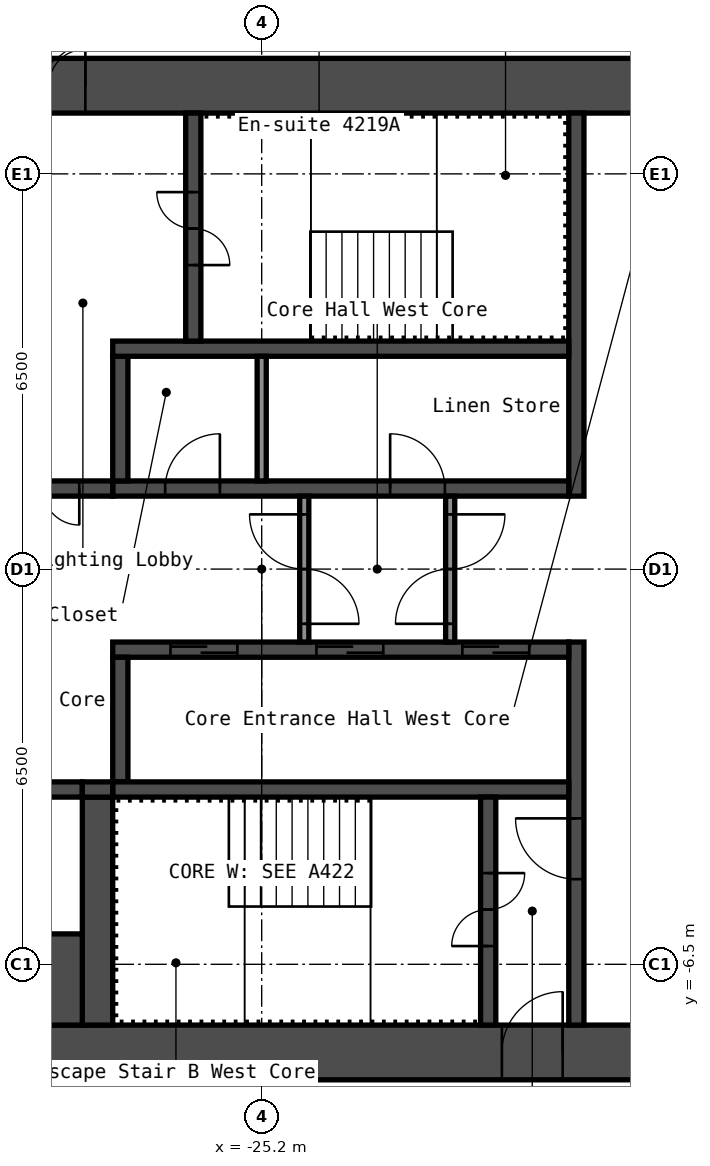
"""IFC4 building model, lengths in metres.
Left out: names, types, materials, properties, quantities, classifications, styles, units other than length and angle.
Written with IfcOpenShell. Run it as: python <this file> out.ifc"""

import sys

from ifc_helpers import new_model, si_unit, direction, frame, frame_2d, origin, place, context, subcontext, project, spatial, rectangle, extrude, element, fill, save


model = new_model("IFC4")
c1 = context("Model", 3, precision=1e-05, world=origin(), true_north=direction((0.0, 1.0)))
c2 = subcontext(c1, "Body", "Model", "MODEL_VIEW")
j1 = project(units=[si_unit("LENGTHUNIT", "METRE"), si_unit("PLANEANGLEUNIT", "RADIAN")], contexts=[c1])
p1 = place(None, origin())
s1 = spatial("IfcSite", under=j1, at=p1, CompositionType="ELEMENT")
p2 = place(p1, origin())
s2 = spatial("IfcBuilding", under=s1, at=p2, CompositionType="ELEMENT")
p3 = place(p2, frame((0.0, 0.0, 150.2)))
s3 = spatial("IfcBuildingStorey", under=s2, at=p3, CompositionType="ELEMENT", Elevation=150.2)
p4 = place(p3, frame((-32.7, 7.95, 0.0), z_axis=(0.0, 0.0, 1.0), x_axis=(1.0, 0.0, 0.0)))
e1 = element("IfcWall", 1, at=p4, inside=s3, PredefinedType="SHEAR", context=c2, shape_type="SweptSolid", body=[
    extrude(rectangle(XDim=15.0, YDim=0.9, at=frame_2d((7.5, 0.0))), origin(), (0.0, 0.0, 1.0), 2.75),
])
p5 = place(p4, frame((3.4, 0.0, 0.0)))
e2 = element("IfcOpeningElement", 2, at=p5, cuts=e1, PredefinedType="OPENING", context=c2, shape_type="SweptSolid", body=[
    extrude(rectangle(XDim=1.2, YDim=2.1, at=frame_2d((0.6, 1.05))), frame((0.0, 0.46, 0.0), z_axis=(0.0, -1.0, 0.0), x_axis=(1.0, 0.0, 0.0)), (0.0, 0.0, 1.0), 0.92),
])
p6 = place(p4, frame((0.75, 0.0, 0.0)))
e3 = element("IfcOpeningElement", 3, at=p6, cuts=e1, PredefinedType="OPENING", context=c2, shape_type="SweptSolid", body=[
    extrude(rectangle(XDim=0.9, YDim=2.1, at=frame_2d((0.45, 1.05))), frame((0.0, 0.46, 0.0), z_axis=(0.0, -1.0, 0.0), x_axis=(1.0, 0.0, 0.0)), (0.0, 0.0, 1.0), 0.92),
])
p7 = place(p3, frame((-32.7, -7.95, 0.0), z_axis=(0.0, 0.0, 1.0), x_axis=(1.0, 0.0, 0.0)))
e4 = element("IfcWall", 4, at=p7, inside=s3, PredefinedType="SHEAR", context=c2, shape_type="SweptSolid", body=[
    extrude(rectangle(XDim=15.0, YDim=0.9, at=frame_2d((7.5, 0.0))), origin(), (0.0, 0.0, 1.0), 2.75),
])
p8 = place(p7, frame((11.45, 0.0, 0.0)))
e5 = element("IfcOpeningElement", 5, at=p8, cuts=e4, PredefinedType="OPENING", context=c2, shape_type="SweptSolid", body=[
    extrude(rectangle(XDim=1.0, YDim=2.1, at=frame_2d((0.5, 1.05))), frame((0.0, 0.46, 0.0), z_axis=(0.0, -1.0, 0.0), x_axis=(1.0, 0.0, 0.0)), (0.0, 0.0, 1.0), 0.92),
])
p9 = place(p3, frame((-20.025, 1.2, 0.0), z_axis=(0.0, 0.0, 1.0), x_axis=(0.0, 1.0, 0.0)))
e6 = element("IfcWall", 6, at=p9, inside=s3, PredefinedType="SHEAR", context=c2, shape_type="SweptSolid", body=[
    extrude(rectangle(XDim=6.3, YDim=0.25, at=frame_2d((3.15, 0.0))), origin(), (0.0, 0.0, 1.0), 2.75),
])
p10 = place(p3, frame((-20.025, -7.5, 0.0), z_axis=(0.0, 0.0, 1.0), x_axis=(0.0, 1.0, 0.0)))
e7 = element("IfcWall", 7, at=p10, inside=s3, PredefinedType="SHEAR", context=c2, shape_type="SweptSolid", body=[
    extrude(rectangle(XDim=6.3, YDim=0.25, at=frame_2d((3.15, 0.0))), origin(), (0.0, 0.0, 1.0), 2.75),
])
p11 = place(p10, frame((2.4, 0.0, 0.0)))
e8 = element("IfcOpeningElement", 8, at=p11, cuts=e7, PredefinedType="OPENING", context=c2, shape_type="SweptSolid", body=[
    extrude(rectangle(XDim=1.0, YDim=2.1, at=frame_2d((0.5, 1.05))), frame((0.0, 0.135, 0.0), z_axis=(0.0, -1.0, 0.0), x_axis=(1.0, 0.0, 0.0)), (0.0, 0.0, 1.0), 0.27),
])
p12 = place(p3, frame((-27.65, 1.325, 0.0), z_axis=(0.0, 0.0, 1.0), x_axis=(1.0, 0.0, 0.0)))
e9 = element("IfcWall", 9, at=p12, inside=s3, PredefinedType="SHEAR", context=c2, shape_type="SweptSolid", body=[
    extrude(rectangle(XDim=7.5, YDim=0.25, at=frame_2d((3.75, 0.0))), origin(), (0.0, 0.0, 1.0), 2.75),
])
p13 = place(p12, frame((4.562, 0.0, 0.0)))
e10 = element("IfcOpeningElement", 10, at=p13, cuts=e9, PredefinedType="OPENING", context=c2, shape_type="SweptSolid", body=[
    extrude(rectangle(XDim=0.9, YDim=2.1, at=frame_2d((0.45, 1.05))), frame((0.0, 0.135, 0.0), z_axis=(0.0, -1.0, 0.0), x_axis=(1.0, 0.0, 0.0)), (0.0, 0.0, 1.0), 0.27),
])
p14 = place(p12, frame((0.863, 0.0, 0.0)))
e11 = element("IfcOpeningElement", 11, at=p14, cuts=e9, PredefinedType="OPENING", context=c2, shape_type="SweptSolid", body=[
    extrude(rectangle(XDim=0.9, YDim=2.1, at=frame_2d((0.45, 1.05))), frame((0.0, 0.135, 0.0), z_axis=(0.0, -1.0, 0.0), x_axis=(1.0, 0.0, 0.0)), (0.0, 0.0, 1.0), 0.27),
])
p15 = place(p3, frame((-27.525, 1.45, 0.0), z_axis=(0.0, 0.0, 1.0), x_axis=(0.0, 1.0, 0.0)))
e12 = element("IfcWall", 12, at=p15, inside=s3, PredefinedType="SHEAR", context=c2, shape_type="SweptSolid", body=[
    extrude(rectangle(XDim=2.05, YDim=0.25, at=frame_2d((1.025, 0.0))), origin(), (0.0, 0.0, 1.0), 2.75),
])
p16 = place(p3, frame((-27.65, 3.625, 0.0), z_axis=(0.0, 0.0, 1.0), x_axis=(1.0, 0.0, 0.0)))
e13 = element("IfcWall", 13, at=p16, inside=s3, PredefinedType="SHEAR", context=c2, shape_type="SweptSolid", body=[
    extrude(rectangle(XDim=7.5, YDim=0.25, at=frame_2d((3.75, 0.0))), origin(), (0.0, 0.0, 1.0), 2.75),
])
p17 = place(p3, frame((-26.325, 3.75, 0.0), z_axis=(0.0, 0.0, 1.0), x_axis=(0.0, 1.0, 0.0)))
e14 = element("IfcWall", 14, at=p17, inside=s3, PredefinedType="SHEAR", context=c2, shape_type="SweptSolid", body=[
    extrude(rectangle(XDim=3.75, YDim=0.25, at=frame_2d((1.875, 0.0))), origin(), (0.0, 0.0, 1.0), 2.75),
])
p18 = place(p17, frame((1.25, 0.0, 0.0)))
e15 = element("IfcOpeningElement", 15, at=p18, cuts=e14, PredefinedType="OPENING", context=c2, shape_type="SweptSolid", body=[
    extrude(rectangle(XDim=1.2, YDim=2.1, at=frame_2d((0.6, 1.05))), frame((0.0, 0.135, 0.0), z_axis=(0.0, -1.0, 0.0), x_axis=(1.0, 0.0, 0.0)), (0.0, 0.0, 1.0), 0.27),
])
p19 = place(p3, frame((-32.7, 1.325, 0.0), z_axis=(0.0, 0.0, 1.0), x_axis=(1.0, 0.0, 0.0)))
e16 = element("IfcWall", 16, at=p19, inside=s3, PredefinedType="SHEAR", context=c2, shape_type="SweptSolid", body=[
    extrude(rectangle(XDim=5.05, YDim=0.25, at=frame_2d((2.525, 0.0))), origin(), (0.0, 0.0, 1.0), 2.75),
])
p20 = place(p19, frame((3.3, 0.0, 0.0)))
e17 = element("IfcOpeningElement", 17, at=p20, cuts=e16, PredefinedType="OPENING", context=c2, shape_type="SweptSolid", body=[
    extrude(rectangle(XDim=1.2, YDim=2.1, at=frame_2d((0.6, 1.05))), frame((0.0, 0.135, 0.0), z_axis=(0.0, -1.0, 0.0), x_axis=(1.0, 0.0, 0.0)), (0.0, 0.0, 1.0), 0.27),
])
p21 = place(p3, frame((-27.65, -1.325, 0.0), z_axis=(0.0, 0.0, 1.0), x_axis=(1.0, 0.0, 0.0)))
e18 = element("IfcWall", 18, at=p21, inside=s3, PredefinedType="SHEAR", context=c2, shape_type="SweptSolid", body=[
    extrude(rectangle(XDim=7.5, YDim=0.25, at=frame_2d((3.75, 0.0))), origin(), (0.0, 0.0, 1.0), 2.75),
])
p22 = place(p21, frame((5.75, 0.0, 0.0)))
e19 = element("IfcOpeningElement", 19, at=p22, cuts=e18, PredefinedType="OPENING", context=c2, shape_type="SweptSolid", body=[
    extrude(rectangle(XDim=1.1, YDim=2.1, at=frame_2d((0.55, 1.05))), frame((0.0, 0.135, 0.0), z_axis=(0.0, -1.0, 0.0), x_axis=(1.0, 0.0, 0.0)), (0.0, 0.0, 1.0), 0.27),
])
p23 = place(p21, frame((3.35, 0.0, 0.0)))
e20 = element("IfcOpeningElement", 20, at=p23, cuts=e18, PredefinedType="OPENING", context=c2, shape_type="SweptSolid", body=[
    extrude(rectangle(XDim=1.1, YDim=2.1, at=frame_2d((0.55, 1.05))), frame((0.0, 0.135, 0.0), z_axis=(0.0, -1.0, 0.0), x_axis=(1.0, 0.0, 0.0)), (0.0, 0.0, 1.0), 0.27),
])
p24 = place(p21, frame((0.95, 0.0, 0.0)))
e21 = element("IfcOpeningElement", 21, at=p24, cuts=e18, PredefinedType="OPENING", context=c2, shape_type="SweptSolid", body=[
    extrude(rectangle(XDim=1.1, YDim=2.1, at=frame_2d((0.55, 1.05))), frame((0.0, 0.135, 0.0), z_axis=(0.0, -1.0, 0.0), x_axis=(1.0, 0.0, 0.0)), (0.0, 0.0, 1.0), 0.27),
])
p25 = place(p3, frame((-27.525, -3.5, 0.0), z_axis=(0.0, 0.0, 1.0), x_axis=(0.0, 1.0, 0.0)))
e22 = element("IfcWall", 22, at=p25, inside=s3, PredefinedType="SHEAR", context=c2, shape_type="SweptSolid", body=[
    extrude(rectangle(XDim=2.05, YDim=0.25, at=frame_2d((1.025, 0.0))), origin(), (0.0, 0.0, 1.0), 2.75),
])
p26 = place(p3, frame((-27.65, -3.625, 0.0), z_axis=(0.0, 0.0, 1.0), x_axis=(1.0, 0.0, 0.0)))
e23 = element("IfcWall", 23, at=p26, inside=s3, PredefinedType="SHEAR", context=c2, shape_type="SweptSolid", body=[
    extrude(rectangle(XDim=7.5, YDim=0.25, at=frame_2d((3.75, 0.0))), origin(), (0.0, 0.0, 1.0), 2.75),
])
p27 = place(p3, frame((-21.475, -7.5, 0.0), z_axis=(0.0, 0.0, 1.0), x_axis=(0.0, 1.0, 0.0)))
e24 = element("IfcWall", 24, at=p27, inside=s3, PredefinedType="SHEAR", context=c2, shape_type="SweptSolid", body=[
    extrude(rectangle(XDim=3.75, YDim=0.25, at=frame_2d((1.875, 0.0))), origin(), (0.0, 0.0, 1.0), 2.75),
])
p28 = place(p27, frame((1.3, 0.0, 0.0)))
e25 = element("IfcOpeningElement", 25, at=p28, cuts=e24, PredefinedType="OPENING", context=c2, shape_type="SweptSolid", body=[
    extrude(rectangle(XDim=1.2, YDim=2.1, at=frame_2d((0.6, 1.05))), frame((0.0, 0.135, 0.0), z_axis=(0.0, -1.0, 0.0), x_axis=(1.0, 0.0, 0.0)), (0.0, 0.0, 1.0), 0.27),
])
p29 = place(p3, frame((-27.9, -7.5, 0.0), z_axis=(0.0, 0.0, 1.0), x_axis=(0.0, 1.0, 0.0)))
e26 = element("IfcWall", 26, at=p29, inside=s3, PredefinedType="SHEAR", context=c2, shape_type="SweptSolid", body=[
    extrude(rectangle(XDim=3.75, YDim=0.5, at=frame_2d((1.875, 0.0))), origin(), (0.0, 0.0, 1.0), 2.75),
])
p30 = place(p3, frame((-32.7, -3.625, 0.0), z_axis=(0.0, 0.0, 1.0), x_axis=(1.0, 0.0, 0.0)))
e27 = element("IfcWall", 27, at=p30, inside=s3, PredefinedType="SHEAR", context=c2, shape_type="SweptSolid", body=[
    extrude(rectangle(XDim=4.55, YDim=0.25, at=frame_2d((2.275, 0.0))), origin(), (0.0, 0.0, 1.0), 2.75),
])
p31 = place(p30, frame((2.85, 0.0, 0.0)))
e28 = element("IfcOpeningElement", 28, at=p31, cuts=e27, PredefinedType="OPENING", context=c2, shape_type="SweptSolid", body=[
    extrude(rectangle(XDim=1.1, YDim=2.1, at=frame_2d((0.55, 1.05))), frame((0.0, 0.135, 0.0), z_axis=(0.0, -1.0, 0.0), x_axis=(1.0, 0.0, 0.0)), (0.0, 0.0, 1.0), 0.27),
])
p32 = place(p30, frame((0.6, 0.0, 0.0)))
e29 = element("IfcOpeningElement", 29, at=p32, cuts=e27, PredefinedType="OPENING", context=c2, shape_type="SweptSolid", body=[
    extrude(rectangle(XDim=1.1, YDim=2.1, at=frame_2d((0.55, 1.05))), frame((0.0, 0.135, 0.0), z_axis=(0.0, -1.0, 0.0), x_axis=(1.0, 0.0, 0.0)), (0.0, 0.0, 1.0), 0.27),
])
p33 = place(p3, frame((-32.7, -6.75, 0.0), z_axis=(0.0, 0.0, 1.0), x_axis=(1.0, 0.0, 0.0)))
e30 = element("IfcWall", 30, at=p33, inside=s3, PredefinedType="SHEAR", context=c2, shape_type="SweptSolid", body=[
    extrude(rectangle(XDim=4.55, YDim=1.5, at=frame_2d((2.275, 0.0))), origin(), (0.0, 0.0, 1.0), 2.75),
])
p34 = place(p3, frame((-28.15, -3.625, 0.0), z_axis=(0.0, 0.0, 1.0), x_axis=(1.0, 0.0, 0.0)))
e31 = element("IfcWall", 31, at=p34, inside=s3, PredefinedType="SHEAR", context=c2, shape_type="SweptSolid", body=[
    extrude(rectangle(XDim=0.5, YDim=0.25, at=frame_2d((0.25, 0.0))), origin(), (0.0, 0.0, 1.0), 2.75),
])
p35 = place(p3, frame((-22.1, -1.2, 0.0), z_axis=(0.0, 0.0, 1.0), x_axis=(0.0, 1.0, 0.0)))
e32 = element("IfcWall", 32, at=p35, inside=s3, PredefinedType="PARTITIONING", context=c2, shape_type="SweptSolid", body=[
    extrude(rectangle(XDim=2.4, YDim=0.15, at=frame_2d((1.2, 0.0))), origin(), (0.0, 0.0, 1.0), 2.75),
])
p36 = place(p35, frame((0.3, 0.0, 0.0)))
e33 = element("IfcOpeningElement", 33, at=p36, cuts=e32, PredefinedType="OPENING", context=c2, shape_type="SweptSolid", body=[
    extrude(rectangle(XDim=1.8, YDim=2.1, at=frame_2d((0.9, 1.05))), frame((0.0, 0.085, 0.0), z_axis=(0.0, -1.0, 0.0), x_axis=(1.0, 0.0, 0.0)), (0.0, 0.0, 1.0), 0.17),
])
p37 = place(p3, frame((-24.5, -1.2, 0.0), z_axis=(0.0, 0.0, 1.0), x_axis=(0.0, 1.0, 0.0)))
e34 = element("IfcWall", 34, at=p37, inside=s3, PredefinedType="PARTITIONING", context=c2, shape_type="SweptSolid", body=[
    extrude(rectangle(XDim=2.4, YDim=0.15, at=frame_2d((1.2, 0.0))), origin(), (0.0, 0.0, 1.0), 2.75),
])
p38 = place(p37, frame((0.3, 0.0, 0.0)))
e35 = element("IfcOpeningElement", 35, at=p38, cuts=e34, PredefinedType="OPENING", context=c2, shape_type="SweptSolid", body=[
    extrude(rectangle(XDim=1.8, YDim=2.1, at=frame_2d((0.9, 1.05))), frame((0.0, 0.085, 0.0), z_axis=(0.0, -1.0, 0.0), x_axis=(1.0, 0.0, 0.0)), (0.0, 0.0, 1.0), 0.17),
])
p39 = place(p3, frame((-25.2, 1.45, 0.0), z_axis=(0.0, 0.0, 1.0), x_axis=(0.0, 1.0, 0.0)))
e36 = element("IfcWall", 36, at=p39, inside=s3, PredefinedType="PARTITIONING", context=c2, shape_type="SweptSolid", body=[
    extrude(rectangle(XDim=2.05, YDim=0.15, at=frame_2d((1.025, 0.0))), origin(), (0.0, 0.0, 1.0), 2.75),
])
p40 = place(p5, origin())
e37 = element("IfcDoor", 37, at=p40, inside=s3, OperationType="DOUBLE_DOOR_SINGLE_SWING", PredefinedType="DOOR", context=c2, shape_type="SweptSolid", body=[
    extrude(rectangle(XDim=1.2, YDim=2.1, at=frame_2d((0.6, 1.05))), frame((0.0, 0.025, 0.0), z_axis=(0.0, -1.0, 0.0), x_axis=(1.0, 0.0, 0.0)), (0.0, 0.0, 1.0), 0.05),
])
fill(e2, e37)
p41 = place(p8, origin())
e38 = element("IfcDoor", 38, at=p41, inside=s3, OperationType="SINGLE_SWING_LEFT", PredefinedType="DOOR", context=c2, shape_type="SweptSolid", body=[
    extrude(rectangle(XDim=1.0, YDim=2.1, at=frame_2d((0.5, 1.05))), frame((0.0, 0.025, 0.0), z_axis=(0.0, -1.0, 0.0), x_axis=(1.0, 0.0, 0.0)), (0.0, 0.0, 1.0), 0.05),
])
fill(e5, e38)
p42 = place(p18, origin())
e39 = element("IfcDoor", 39, at=p42, inside=s3, OperationType="DOUBLE_DOOR_SINGLE_SWING", PredefinedType="DOOR", context=c2, shape_type="SweptSolid", body=[
    extrude(rectangle(XDim=1.2, YDim=2.1, at=frame_2d((0.6, 1.05))), frame((0.0, 0.025, 0.0), z_axis=(0.0, -1.0, 0.0), x_axis=(1.0, 0.0, 0.0)), (0.0, 0.0, 1.0), 0.05),
])
fill(e15, e39)
p43 = place(p28, origin())
e40 = element("IfcDoor", 40, at=p43, inside=s3, OperationType="DOUBLE_DOOR_SINGLE_SWING", PredefinedType="DOOR", context=c2, shape_type="SweptSolid", body=[
    extrude(rectangle(XDim=1.2, YDim=2.1, at=frame_2d((0.6, 1.05))), frame((0.0, 0.025, 0.0), z_axis=(0.0, -1.0, 0.0), x_axis=(1.0, 0.0, 0.0)), (0.0, 0.0, 1.0), 0.05),
])
fill(e25, e40)
p44 = place(p11, origin())
e41 = element("IfcDoor", 41, at=p44, inside=s3, OperationType="SINGLE_SWING_LEFT", PredefinedType="DOOR", context=c2, shape_type="SweptSolid", body=[
    extrude(rectangle(XDim=1.0, YDim=2.1, at=frame_2d((0.5, 1.05))), frame((0.0, 0.025, 0.0), z_axis=(0.0, -1.0, 0.0), x_axis=(1.0, 0.0, 0.0)), (0.0, 0.0, 1.0), 0.05),
])
fill(e8, e41)
p45 = place(p20, origin())
e42 = element("IfcDoor", 42, at=p45, inside=s3, OperationType="DOUBLE_DOOR_SINGLE_SWING", PredefinedType="DOOR", context=c2, shape_type="SweptSolid", body=[
    extrude(rectangle(XDim=1.2, YDim=2.1, at=frame_2d((0.6, 1.05))), frame((0.0, 0.025, 0.0), z_axis=(0.0, -1.0, 0.0), x_axis=(1.0, 0.0, 0.0)), (0.0, 0.0, 1.0), 0.05),
])
fill(e17, e42)
p46 = place(p36, origin())
e43 = element("IfcDoor", 43, at=p46, inside=s3, OperationType="DOUBLE_DOOR_SINGLE_SWING", PredefinedType="DOOR", context=c2, shape_type="SweptSolid", body=[
    extrude(rectangle(XDim=1.8, YDim=2.1, at=frame_2d((0.9, 1.05))), frame((0.0, 0.025, 0.0), z_axis=(0.0, -1.0, 0.0), x_axis=(1.0, 0.0, 0.0)), (0.0, 0.0, 1.0), 0.05),
])
fill(e33, e43)
p47 = place(p38, origin())
e44 = element("IfcDoor", 44, at=p47, inside=s3, OperationType="DOUBLE_DOOR_SINGLE_SWING", PredefinedType="DOOR", context=c2, shape_type="SweptSolid", body=[
    extrude(rectangle(XDim=1.8, YDim=2.1, at=frame_2d((0.9, 1.05))), frame((0.0, 0.025, 0.0), z_axis=(0.0, -1.0, 0.0), x_axis=(1.0, 0.0, 0.0)), (0.0, 0.0, 1.0), 0.05),
])
fill(e35, e44)
p48 = place(p13, origin())
e45 = element("IfcDoor", 45, at=p48, inside=s3, OperationType="SINGLE_SWING_RIGHT", PredefinedType="DOOR", context=c2, shape_type="SweptSolid", body=[
    extrude(rectangle(XDim=0.9, YDim=2.1, at=frame_2d((0.45, 1.05))), frame((0.0, 0.025, 0.0), z_axis=(0.0, -1.0, 0.0), x_axis=(1.0, 0.0, 0.0)), (0.0, 0.0, 1.0), 0.05),
])
fill(e10, e45)
p49 = place(p14, origin())
e46 = element("IfcDoor", 46, at=p49, inside=s3, OperationType="SINGLE_SWING_LEFT", PredefinedType="DOOR", context=c2, shape_type="SweptSolid", body=[
    extrude(rectangle(XDim=0.9, YDim=2.1, at=frame_2d((0.45, 1.05))), frame((0.0, 0.025, 0.0), z_axis=(0.0, -1.0, 0.0), x_axis=(1.0, 0.0, 0.0)), (0.0, 0.0, 1.0), 0.05),
])
fill(e11, e46)
p50 = place(p22, origin())
e47 = element("IfcDoor", 47, at=p50, inside=s3, OperationType="DOUBLE_DOOR_SLIDING", PredefinedType="DOOR", context=c2, shape_type="SweptSolid", body=[
    extrude(rectangle(XDim=1.1, YDim=2.1, at=frame_2d((0.55, 1.05))), frame((0.0, 0.025, 0.0), z_axis=(0.0, -1.0, 0.0), x_axis=(1.0, 0.0, 0.0)), (0.0, 0.0, 1.0), 0.05),
])
fill(e19, e47)
p51 = place(p23, origin())
e48 = element("IfcDoor", 48, at=p51, inside=s3, OperationType="DOUBLE_DOOR_SLIDING", PredefinedType="DOOR", context=c2, shape_type="SweptSolid", body=[
    extrude(rectangle(XDim=1.1, YDim=2.1, at=frame_2d((0.55, 1.05))), frame((0.0, 0.025, 0.0), z_axis=(0.0, -1.0, 0.0), x_axis=(1.0, 0.0, 0.0)), (0.0, 0.0, 1.0), 0.05),
])
fill(e20, e48)
p52 = place(p24, origin())
e49 = element("IfcDoor", 49, at=p52, inside=s3, OperationType="DOUBLE_DOOR_SLIDING", PredefinedType="DOOR", context=c2, shape_type="SweptSolid", body=[
    extrude(rectangle(XDim=1.1, YDim=2.1, at=frame_2d((0.55, 1.05))), frame((0.0, 0.025, 0.0), z_axis=(0.0, -1.0, 0.0), x_axis=(1.0, 0.0, 0.0)), (0.0, 0.0, 1.0), 0.05),
])
fill(e21, e49)
save(model, sys.argv[1])
